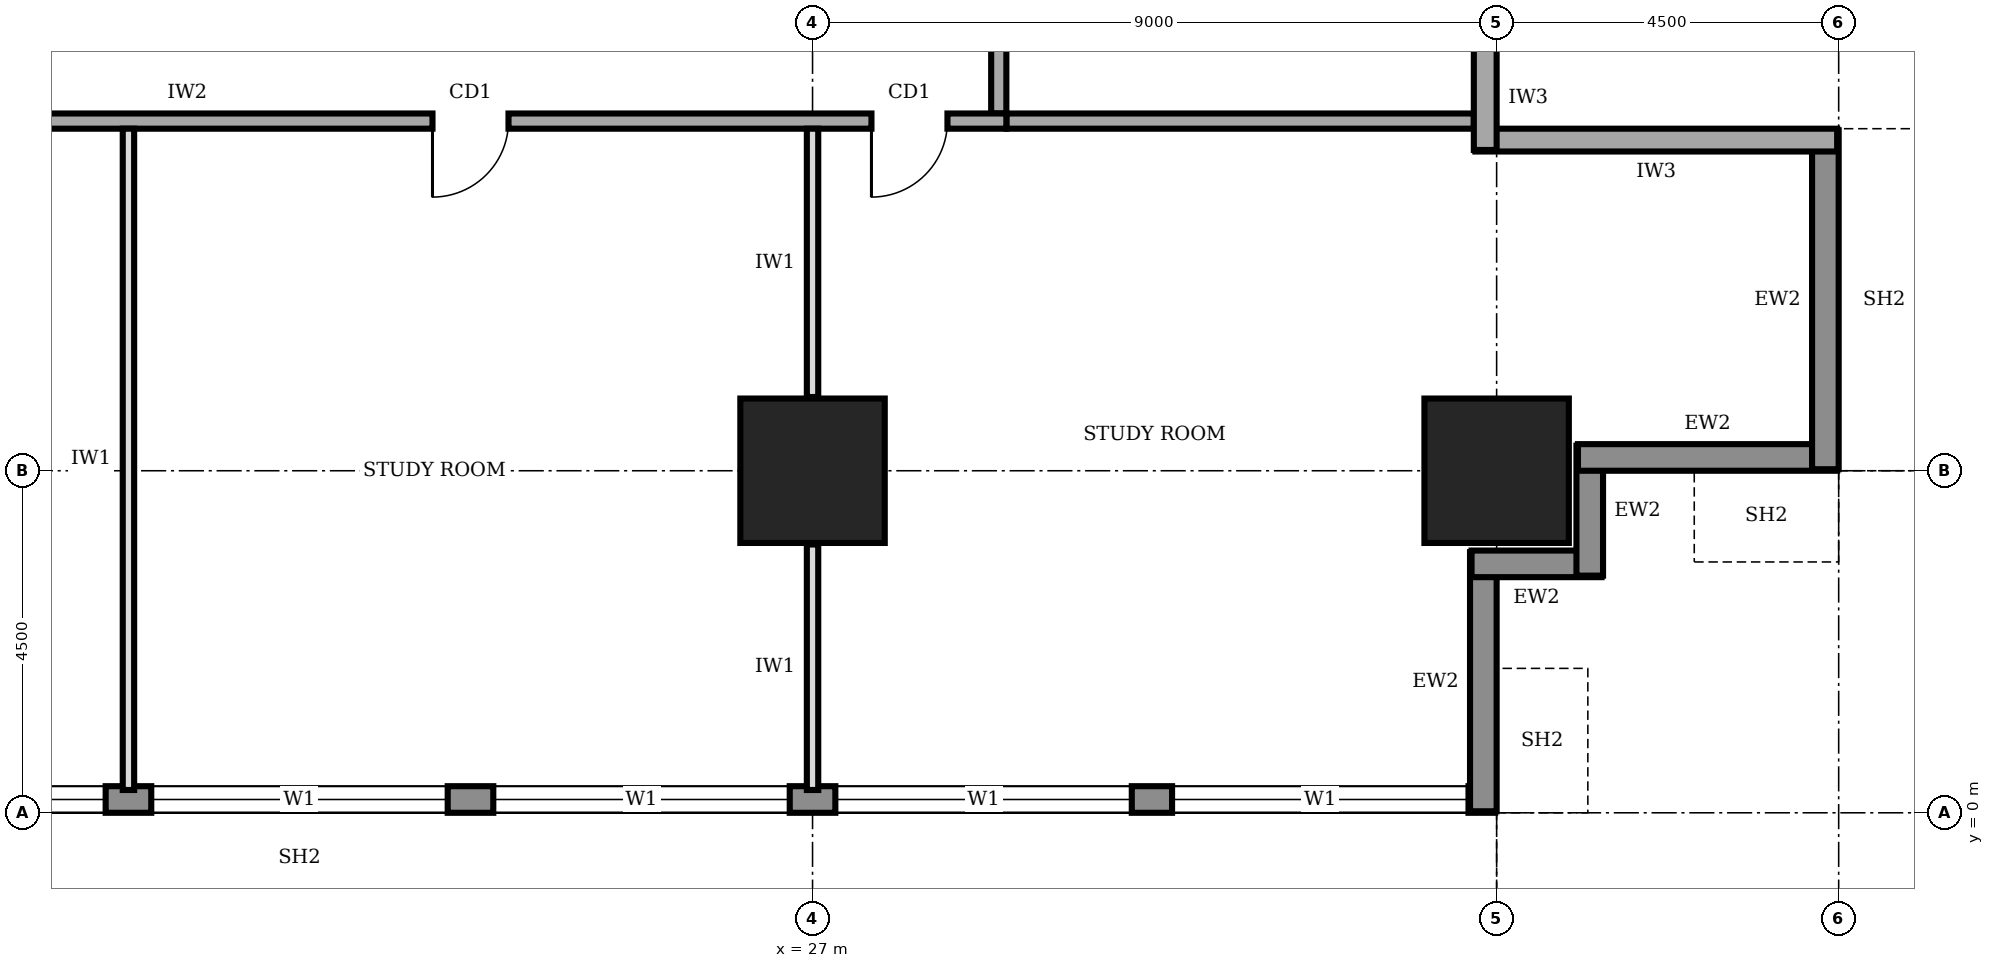
"""IFC4 building model, lengths in metres.
Left out: names, types, materials, properties, quantities, classifications, styles, units other than length and angle.
Written with IfcOpenShell. Run it as: python <this file> out.ifc"""

import sys

from ifc_helpers import new_model, si_unit, direction, frame, frame_2d, origin, origin_2d, place, context, subcontext, project, spatial, rectangle, extrude, element, fill, save


model = new_model("IFC4")
c1 = context("Model", 3, precision=1e-05, world=origin(), true_north=direction((0.0, 1.0)))
c2 = subcontext(c1, "Body", "Model", "MODEL_VIEW")
j1 = project(units=[si_unit("LENGTHUNIT", "METRE"), si_unit("PLANEANGLEUNIT", "RADIAN")], contexts=[c1])
p1 = place(None, origin())
s1 = spatial("IfcSite", under=j1, at=p1, CompositionType="ELEMENT")
p2 = place(p1, origin())
s2 = spatial("IfcBuilding", under=s1, at=p2, CompositionType="ELEMENT")
p3 = place(p2, frame((0.0, 0.0, 125.0)))
s3 = spatial("IfcBuildingStorey", under=s2, at=p3, CompositionType="ELEMENT", Elevation=125.0)
for number, where, z_axis, x_axis in (
    (1, (27.0, 4.5, 0.0), (0.0, 0.0, 1.0), (1.0, 0.0, 0.0)),
    (2, (36.0, 4.5, 0.0), (0.0, 0.0, 1.0), (1.0, 0.0, 0.0)),
):
    element("IfcColumn", number, at=place(p3, frame(where, z_axis=z_axis, x_axis=x_axis)), inside=s3, PredefinedType="COLUMN", context=c2, shape_type="SweptSolid", body=[
        extrude(rectangle(XDim=1.9, YDim=1.9, at=origin_2d()), origin(), (0.0, 0.0, 1.0), 4.0),
    ])
p4 = place(p3, frame((4.52, 0.175, 0.0), z_axis=(0.0, 0.0, 1.0), x_axis=(1.0, 0.0, 0.0)))
e3 = element("IfcWall", 3, at=p4, inside=s3, PredefinedType="STANDARD", context=c2, shape_type="SweptSolid", body=[
    extrude(rectangle(XDim=31.46, YDim=0.35, at=frame_2d((15.73, 0.0))), origin(), (0.0, 0.0, 1.0), 3.75),
])
p5 = place(p4, frame((4.78, 0.0, 0.9)))
e4 = element("IfcOpeningElement", 4, at=p5, cuts=e3, PredefinedType="OPENING", context=c2, shape_type="SweptSolid", body=[
    extrude(rectangle(XDim=3.9, YDim=2.2, at=frame_2d((1.95, 1.1))), frame((0.0, 0.185, 0.0), z_axis=(0.0, -1.0, 0.0), x_axis=(1.0, 0.0, 0.0)), (0.0, 0.0, 1.0), 0.37),
])
p6 = place(p4, frame((9.28, 0.0, 0.9)))
e5 = element("IfcOpeningElement", 5, at=p6, cuts=e3, PredefinedType="OPENING", context=c2, shape_type="SweptSolid", body=[
    extrude(rectangle(XDim=3.9, YDim=2.2, at=frame_2d((1.95, 1.1))), frame((0.0, 0.185, 0.0), z_axis=(0.0, -1.0, 0.0), x_axis=(1.0, 0.0, 0.0)), (0.0, 0.0, 1.0), 0.37),
])
p7 = place(p4, frame((13.78, 0.0, 0.9)))
e6 = element("IfcOpeningElement", 6, at=p7, cuts=e3, PredefinedType="OPENING", context=c2, shape_type="SweptSolid", body=[
    extrude(rectangle(XDim=3.9, YDim=2.2, at=frame_2d((1.95, 1.1))), frame((0.0, 0.185, 0.0), z_axis=(0.0, -1.0, 0.0), x_axis=(1.0, 0.0, 0.0)), (0.0, 0.0, 1.0), 0.37),
])
p8 = place(p4, frame((18.28, 0.0, 0.9)))
e7 = element("IfcOpeningElement", 7, at=p8, cuts=e3, PredefinedType="OPENING", context=c2, shape_type="SweptSolid", body=[
    extrude(rectangle(XDim=3.9, YDim=2.2, at=frame_2d((1.95, 1.1))), frame((0.0, 0.185, 0.0), z_axis=(0.0, -1.0, 0.0), x_axis=(1.0, 0.0, 0.0)), (0.0, 0.0, 1.0), 0.37),
])
p9 = place(p4, frame((22.78, 0.0, 0.9)))
e8 = element("IfcOpeningElement", 8, at=p9, cuts=e3, PredefinedType="OPENING", context=c2, shape_type="SweptSolid", body=[
    extrude(rectangle(XDim=3.9, YDim=2.2, at=frame_2d((1.95, 1.1))), frame((0.0, 0.185, 0.0), z_axis=(0.0, -1.0, 0.0), x_axis=(1.0, 0.0, 0.0)), (0.0, 0.0, 1.0), 0.37),
])
p10 = place(p4, frame((27.21, 0.0, 0.9)))
e9 = element("IfcOpeningElement", 9, at=p10, cuts=e3, PredefinedType="OPENING", context=c2, shape_type="SweptSolid", body=[
    extrude(rectangle(XDim=3.9, YDim=2.2, at=frame_2d((1.95, 1.1))), frame((0.0, 0.185, 0.0), z_axis=(0.0, -1.0, 0.0), x_axis=(1.0, 0.0, 0.0)), (0.0, 0.0, 1.0), 0.37),
])
p11 = place(p3, frame((35.825, 0.02, 0.0), z_axis=(0.0, 0.0, 1.0), x_axis=(0.0, 1.0, 0.0)))
e10 = element("IfcWall", 10, at=p11, inside=s3, PredefinedType="STANDARD", context=c2, shape_type="SweptSolid", body=[
    extrude(rectangle(XDim=3.41, YDim=0.35, at=frame_2d((1.705, 0.0))), origin(), (0.0, 0.0, 1.0), 2.85),
])
for number, where, z_axis, x_axis in (
    (11, (35.67, 3.275, 0.0), (0.0, 0.0, 1.0), (1.0, 0.0, 0.0)),
    (12, (37.225, 3.12, 0.0), (0.0, 0.0, 1.0), (0.0, 1.0, 0.0)),
):
    element("IfcWall", number, at=place(p3, frame(where, z_axis=z_axis, x_axis=x_axis)), inside=s3, PredefinedType="STANDARD", context=c2, shape_type="SweptSolid", body=[
        extrude(rectangle(XDim=1.71, YDim=0.35, at=frame_2d((0.855, 0.0))), origin(), (0.0, 0.0, 1.0), 3.75),
    ])
p12 = place(p3, frame((37.07, 4.675, 0.0), z_axis=(0.0, 0.0, 1.0), x_axis=(1.0, 0.0, 0.0)))
e13 = element("IfcWall", 13, at=p12, inside=s3, PredefinedType="STANDARD", context=c2, shape_type="SweptSolid", body=[
    extrude(rectangle(XDim=3.41, YDim=0.35, at=frame_2d((1.705, 0.0))), origin(), (0.0, 0.0, 1.0), 2.85),
])
p13 = place(p3, frame((40.325, 4.52, 0.0), z_axis=(0.0, 0.0, 1.0), x_axis=(0.0, 1.0, 0.0)))
e14 = element("IfcWall", 14, at=p13, inside=s3, PredefinedType="STANDARD", context=c2, shape_type="SweptSolid", body=[
    extrude(rectangle(XDim=4.46, YDim=0.35, at=frame_2d((2.23, 0.0))), origin(), (0.0, 0.0, 1.0), 3.75),
])
p14 = place(p3, frame((40.48, 8.85, 0.0), z_axis=(0.0, 0.0, 1.0), x_axis=(-1.0, 0.0, 0.0)))
e15 = element("IfcWall", 15, at=p14, inside=s3, PredefinedType="SOLIDWALL", context=c2, shape_type="SweptSolid", body=[
    extrude(rectangle(XDim=4.76, YDim=0.3, at=frame_2d((2.38, 0.0))), origin(), (0.0, 0.0, 1.0), 3.75),
])
p15 = place(p3, frame((35.85, 8.72, 0.0), z_axis=(0.0, 0.0, 1.0), x_axis=(0.0, 1.0, 0.0)))
e16 = element("IfcWall", 16, at=p15, inside=s3, PredefinedType="SOLIDWALL", context=c2, shape_type="SweptSolid", body=[
    extrude(rectangle(XDim=1.38, YDim=0.3, at=frame_2d((0.69, 0.0))), origin(), (0.0, 0.0, 1.0), 2.65),
])
p16 = place(p3, frame((11.9, 9.1, 0.0), z_axis=(0.0, 0.0, 1.0), x_axis=(1.0, 0.0, 0.0)))
e17 = element("IfcWall", 17, at=p16, inside=s3, PredefinedType="SOLIDWALL", context=c2, shape_type="SweptSolid", body=[
    extrude(rectangle(XDim=17.65, YDim=0.2, at=frame_2d((8.825, 0.0))), origin(), (0.0, 0.0, 1.0), 3.75),
])
p17 = place(p16, frame((2.25, 0.0, 0.0)))
e18 = element("IfcOpeningElement", 18, at=p17, cuts=e17, PredefinedType="OPENING", context=c2, shape_type="SweptSolid", body=[
    extrude(rectangle(XDim=1.4, YDim=2.1, at=frame_2d((0.7, 1.05))), frame((0.0, 0.11, 0.0), z_axis=(0.0, -1.0, 0.0), x_axis=(1.0, 0.0, 0.0)), (0.0, 0.0, 1.0), 0.22),
])
p18 = place(p16, frame((10.1, 0.0, 0.0)))
e19 = element("IfcOpeningElement", 19, at=p18, cuts=e17, PredefinedType="OPENING", context=c2, shape_type="SweptSolid", body=[
    extrude(rectangle(XDim=1.0, YDim=2.1, at=frame_2d((0.5, 1.05))), frame((0.0, 0.11, 0.0), z_axis=(0.0, -1.0, 0.0), x_axis=(1.0, 0.0, 0.0)), (0.0, 0.0, 1.0), 0.22),
])
p19 = place(p16, frame((15.875, 0.0, 0.0)))
e20 = element("IfcOpeningElement", 20, at=p19, cuts=e17, PredefinedType="OPENING", context=c2, shape_type="SweptSolid", body=[
    extrude(rectangle(XDim=1.0, YDim=2.1, at=frame_2d((0.5, 1.05))), frame((0.0, 0.11, 0.0), z_axis=(0.0, -1.0, 0.0), x_axis=(1.0, 0.0, 0.0)), (0.0, 0.0, 1.0), 0.22),
])
p20 = place(p3, frame((29.45, 9.2, 0.0), z_axis=(0.0, 0.0, 1.0), x_axis=(0.0, 1.0, 0.0)))
e21 = element("IfcWall", 21, at=p20, inside=s3, PredefinedType="SOLIDWALL", context=c2, shape_type="SweptSolid", body=[
    extrude(rectangle(XDim=23.05, YDim=0.2, at=frame_2d((11.525, 0.0))), origin(), (0.0, 0.0, 1.0), 3.75),
])
p21 = place(p20, frame((10.525, 0.0, 0.0)))
e22 = element("IfcOpeningElement", 22, at=p21, cuts=e21, PredefinedType="OPENING", context=c2, shape_type="SweptSolid", body=[
    extrude(rectangle(XDim=1.8, YDim=2.1, at=frame_2d((0.9, 1.05))), frame((0.0, 0.11, 0.0), z_axis=(0.0, -1.0, 0.0), x_axis=(1.0, 0.0, 0.0)), (0.0, 0.0, 1.0), 0.22),
])
p22 = place(p3, frame((29.55, 9.1, 0.0), z_axis=(0.0, 0.0, 1.0), x_axis=(1.0, 0.0, 0.0)))
e23 = element("IfcWall", 23, at=p22, inside=s3, PredefinedType="SOLIDWALL", context=c2, shape_type="SweptSolid", body=[
    extrude(rectangle(XDim=6.15, YDim=0.2, at=frame_2d((3.075, 0.0))), origin(), (0.0, 0.0, 1.0), 3.75),
])
p23 = place(p3, frame((18.0, 0.3, 0.0), z_axis=(0.0, 0.0, 1.0), x_axis=(0.0, 1.0, 0.0)))
e24 = element("IfcWall", 24, at=p23, inside=s3, PredefinedType="PARTITIONING", context=c2, shape_type="SweptSolid", body=[
    extrude(rectangle(XDim=8.7, YDim=0.15, at=frame_2d((4.35, 0.0))), origin(), (0.0, 0.0, 1.0), 3.75),
])
p24 = place(p3, frame((27.0, 0.3, 0.0), z_axis=(0.0, 0.0, 1.0), x_axis=(0.0, 1.0, 0.0)))
e25 = element("IfcWall", 25, at=p24, inside=s3, PredefinedType="PARTITIONING", context=c2, shape_type="SweptSolid", body=[
    extrude(rectangle(XDim=3.23, YDim=0.15, at=frame_2d((1.615, 0.0))), origin(), (0.0, 0.0, 1.0), 2.85),
])
p25 = place(p3, frame((27.0, 5.47, 0.0), z_axis=(0.0, 0.0, 1.0), x_axis=(0.0, 1.0, 0.0)))
e26 = element("IfcWall", 26, at=p25, inside=s3, PredefinedType="PARTITIONING", context=c2, shape_type="SweptSolid", body=[
    extrude(rectangle(XDim=3.53, YDim=0.15, at=frame_2d((1.765, 0.0))), origin(), (0.0, 0.0, 1.0), 2.85),
])
p26 = place(p6, origin())
e27 = element("IfcWindow", 27, at=p26, inside=s3, PartitioningType="SINGLE_PANEL", PredefinedType="WINDOW", context=c2, shape_type="SweptSolid", body=[
    extrude(rectangle(XDim=3.9, YDim=2.2, at=frame_2d((1.95, 1.1))), frame((0.0, 0.03, 0.0), z_axis=(0.0, -1.0, 0.0), x_axis=(1.0, 0.0, 0.0)), (0.0, 0.0, 1.0), 0.06),
])
fill(e5, e27)
p27 = place(p7, origin())
e28 = element("IfcWindow", 28, at=p27, inside=s3, PartitioningType="SINGLE_PANEL", PredefinedType="WINDOW", context=c2, shape_type="SweptSolid", body=[
    extrude(rectangle(XDim=3.9, YDim=2.2, at=frame_2d((1.95, 1.1))), frame((0.0, 0.03, 0.0), z_axis=(0.0, -1.0, 0.0), x_axis=(1.0, 0.0, 0.0)), (0.0, 0.0, 1.0), 0.06),
])
fill(e6, e28)
p28 = place(p8, origin())
e29 = element("IfcWindow", 29, at=p28, inside=s3, PartitioningType="SINGLE_PANEL", PredefinedType="WINDOW", context=c2, shape_type="SweptSolid", body=[
    extrude(rectangle(XDim=3.9, YDim=2.2, at=frame_2d((1.95, 1.1))), frame((0.0, 0.03, 0.0), z_axis=(0.0, -1.0, 0.0), x_axis=(1.0, 0.0, 0.0)), (0.0, 0.0, 1.0), 0.06),
])
fill(e7, e29)
p29 = place(p9, origin())
e30 = element("IfcWindow", 30, at=p29, inside=s3, PartitioningType="SINGLE_PANEL", PredefinedType="WINDOW", context=c2, shape_type="SweptSolid", body=[
    extrude(rectangle(XDim=3.9, YDim=2.2, at=frame_2d((1.95, 1.1))), frame((0.0, 0.03, 0.0), z_axis=(0.0, -1.0, 0.0), x_axis=(1.0, 0.0, 0.0)), (0.0, 0.0, 1.0), 0.06),
])
fill(e8, e30)
p30 = place(p10, origin())
e31 = element("IfcWindow", 31, at=p30, inside=s3, PartitioningType="SINGLE_PANEL", PredefinedType="WINDOW", context=c2, shape_type="SweptSolid", body=[
    extrude(rectangle(XDim=3.9, YDim=2.2, at=frame_2d((1.95, 1.1))), frame((0.0, 0.03, 0.0), z_axis=(0.0, -1.0, 0.0), x_axis=(1.0, 0.0, 0.0)), (0.0, 0.0, 1.0), 0.06),
])
fill(e9, e31)
p31 = place(p18, frame((1.0, 0.0, 0.0), z_axis=(0.0, 0.0, 1.0), x_axis=(-1.0, 0.0, 0.0)))
e32 = element("IfcDoor", 32, at=p31, inside=s3, OperationType="SINGLE_SWING_RIGHT", PredefinedType="DOOR", context=c2, shape_type="SweptSolid", body=[
    extrude(rectangle(XDim=1.0, YDim=2.1, at=frame_2d((0.5, 1.05))), frame((0.0, 0.025, 0.0), z_axis=(0.0, -1.0, 0.0), x_axis=(1.0, 0.0, 0.0)), (0.0, 0.0, 1.0), 0.05),
])
fill(e19, e32)
p32 = place(p19, frame((1.0, 0.0, 0.0), z_axis=(0.0, 0.0, 1.0), x_axis=(-1.0, 0.0, 0.0)))
e33 = element("IfcDoor", 33, at=p32, inside=s3, OperationType="SINGLE_SWING_RIGHT", PredefinedType="DOOR", context=c2, shape_type="SweptSolid", body=[
    extrude(rectangle(XDim=1.0, YDim=2.1, at=frame_2d((0.5, 1.05))), frame((0.0, 0.025, 0.0), z_axis=(0.0, -1.0, 0.0), x_axis=(1.0, 0.0, 0.0)), (0.0, 0.0, 1.0), 0.05),
])
fill(e20, e33)
save(model, sys.argv[1])
